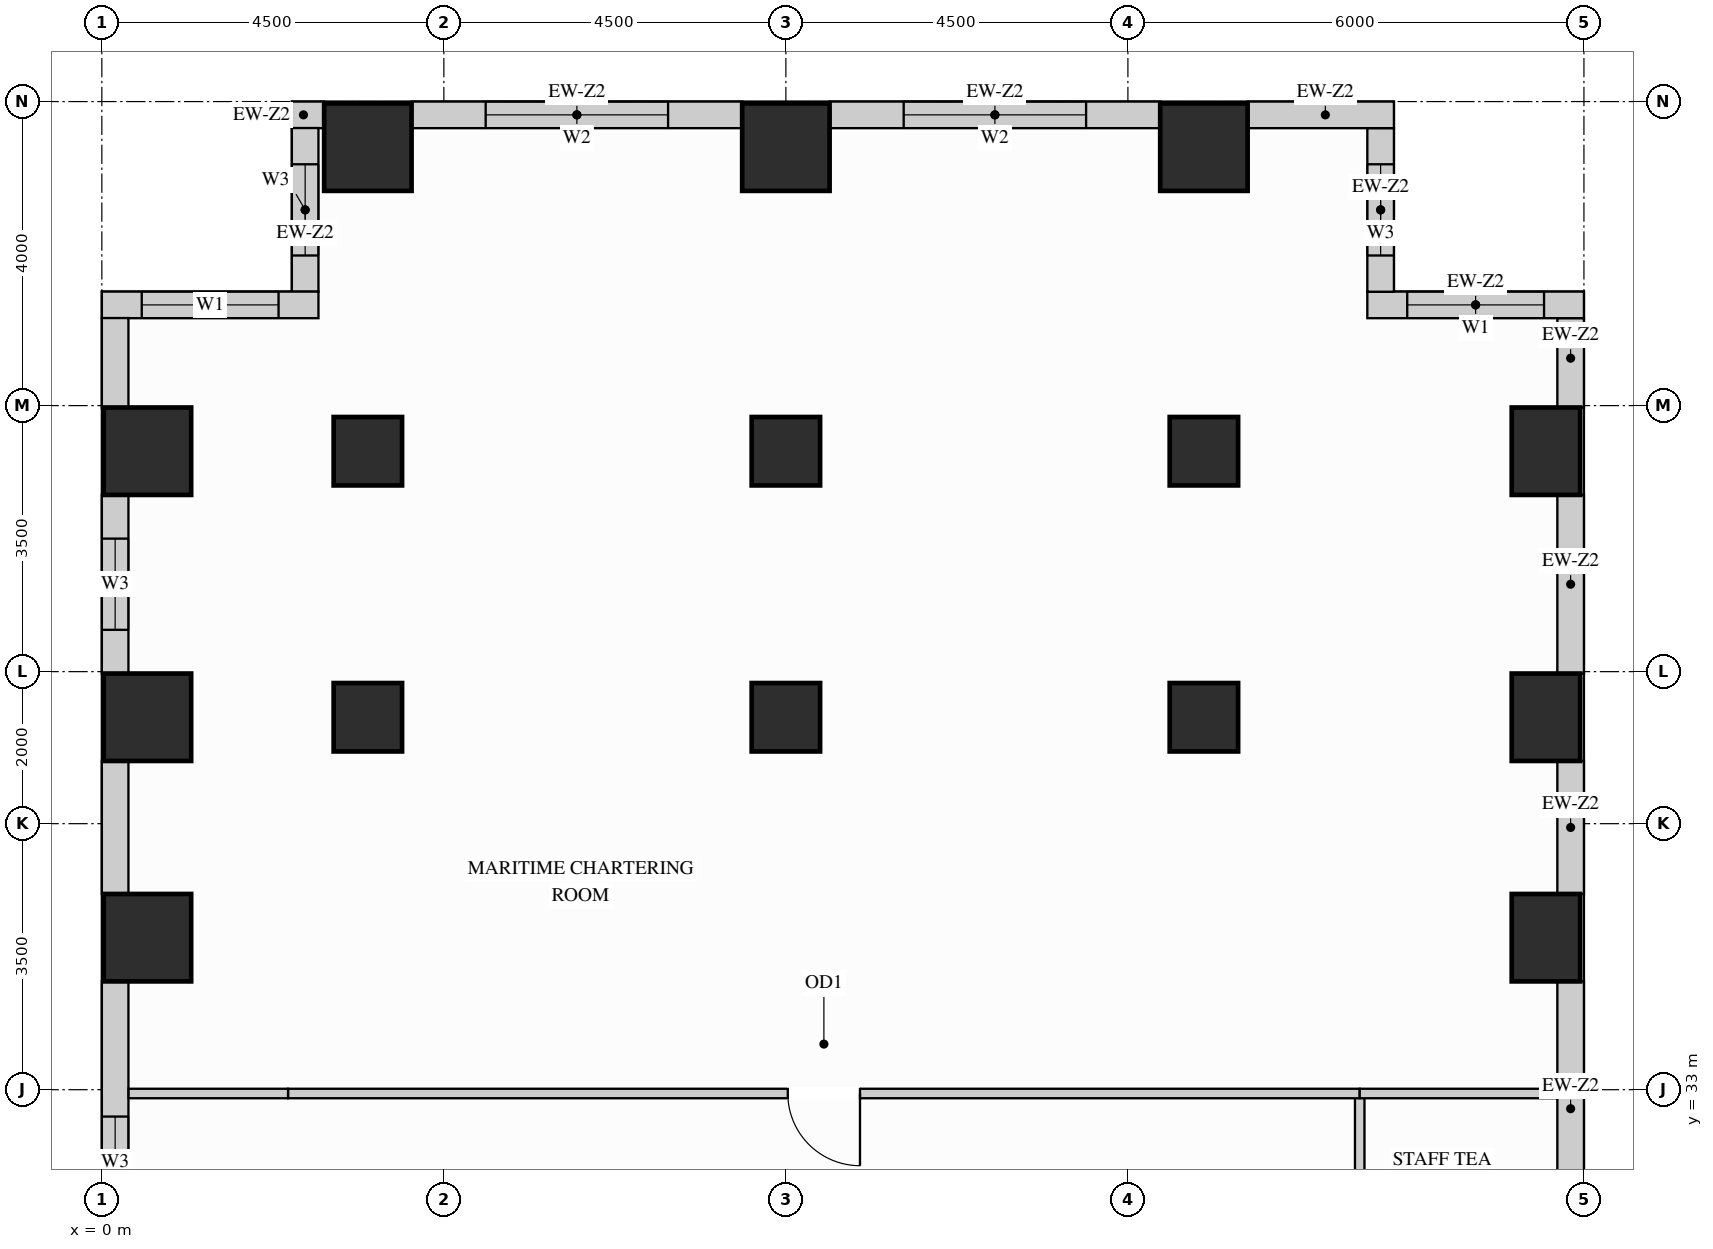
"""IFC4 building model, lengths in metres.
Left out: names, types, materials, properties, quantities, classifications, styles, units other than length and angle.
Written with IfcOpenShell. Run it as: python <this file> out.ifc"""

import sys

from ifc_helpers import new_model, si_unit, direction, frame, frame_2d, origin, origin_2d, place, context, subcontext, project, spatial, rectangle, extrude, source, transform, mapped, element, fill, save


model = new_model("IFC4")
c1 = context("Model", 3, precision=1e-05, world=origin(), true_north=direction((0.0, 1.0)))
c2 = subcontext(c1, "Body", "Model", "MODEL_VIEW")
j1 = project(units=[si_unit("LENGTHUNIT", "METRE"), si_unit("PLANEANGLEUNIT", "RADIAN")], contexts=[c1])
p1 = place(None, origin())
s1 = spatial("IfcSite", under=j1, at=p1, CompositionType="ELEMENT")
p2 = place(p1, origin())
s2 = spatial("IfcBuilding", under=s1, at=p2, CompositionType="ELEMENT")
p3 = place(p2, frame((0.0, 0.0, 124.2)))
s3 = spatial("IfcBuildingStorey", under=s2, at=p3, CompositionType="ELEMENT", Elevation=124.2)
m1 = source(origin(), c2, "Body", "SweptSolid", [
    extrude(rectangle(XDim=0.9, YDim=0.9, at=origin_2d()), origin(), (0.0, 0.0, 1.0), 3.38),
])
for number, where, z_axis, x_axis in (
    (1, (14.5, 37.9, 0.0), (0.0, 0.0, 1.0), (1.0, 0.0, 0.0)),
    (2, (14.5, 41.4, 0.0), (0.0, 0.0, 1.0), (1.0, 0.0, 0.0)),
    (3, (3.5, 37.9, 0.0), (0.0, 0.0, 1.0), (1.0, 0.0, 0.0)),
    (4, (3.5, 41.4, 0.0), (0.0, 0.0, 1.0), (1.0, 0.0, 0.0)),
    (5, (9.0, 37.9, 0.0), (0.0, 0.0, 1.0), (1.0, 0.0, 0.0)),
    (6, (9.0, 41.4, 0.0), (0.0, 0.0, 1.0), (1.0, 0.0, 0.0)),
):
    element("IfcColumn", number, at=place(p3, frame(where, z_axis=z_axis, x_axis=x_axis)), inside=s3, PredefinedType="COLUMN", context=c2, shape_type="MappedRepresentation", body=[
        mapped(m1, transform((0.0, 0.0, 0.0), x_axis=(1.0, 0.0, 0.0), y_axis=(0.0, 1.0, 0.0), z_axis=(0.0, 0.0, 1.0))),
    ])
m2 = source(origin(), c2, "Body", "SweptSolid", [
    extrude(rectangle(XDim=0.9, YDim=1.15, at=origin_2d()), origin(), (0.0, 0.0, 1.0), 3.38),
])
for number, where, z_axis, x_axis in (
    (7, (19.0, 35.0, 0.0), (0.0, 0.0, 1.0), (1.0, 0.0, 0.0)),
    (8, (19.0, 37.9, 0.0), (0.0, 0.0, 1.0), (1.0, 0.0, 0.0)),
    (9, (19.0, 41.4, 0.0), (0.0, 0.0, 1.0), (1.0, 0.0, 0.0)),
):
    element("IfcColumn", number, at=place(p3, frame(where, z_axis=z_axis, x_axis=x_axis)), inside=s3, PredefinedType="COLUMN", context=c2, shape_type="MappedRepresentation", body=[
        mapped(m2, transform((0.0, 0.0, 0.0), x_axis=(1.0, 0.0, 0.0), y_axis=(0.0, 1.0, 0.0), z_axis=(0.0, 0.0, 1.0))),
    ])
m3 = source(origin(), c2, "Body", "SweptSolid", [
    extrude(rectangle(XDim=1.15, YDim=1.15, at=origin_2d()), origin(), (0.0, 0.0, 1.0), 3.38),
])
for number, where, z_axis, x_axis in (
    (10, (14.5, 45.4, 0.0), (0.0, 0.0, 1.0), (1.0, 0.0, 0.0)),
    (11, (3.5, 45.4, 0.0), (0.0, 0.0, 1.0), (1.0, 0.0, 0.0)),
    (12, (9.0, 45.4, 0.0), (0.0, 0.0, 1.0), (1.0, 0.0, 0.0)),
    (13, (0.6, 35.0, 0.0), (0.0, 0.0, 1.0), (1.0, 0.0, 0.0)),
    (14, (0.6, 37.9, 0.0), (0.0, 0.0, 1.0), (1.0, 0.0, 0.0)),
    (15, (0.6, 41.4, 0.0), (0.0, 0.0, 1.0), (1.0, 0.0, 0.0)),
):
    element("IfcColumn", number, at=place(p3, frame(where, z_axis=z_axis, x_axis=x_axis)), inside=s3, PredefinedType="COLUMN", context=c2, shape_type="MappedRepresentation", body=[
        mapped(m3, transform((0.0, 0.0, 0.0), x_axis=(1.0, 0.0, 0.0), y_axis=(0.0, 1.0, 0.0), z_axis=(0.0, 0.0, 1.0))),
    ])
m4 = source(origin(), c2, "Body", "SweptSolid", [
    extrude(rectangle(XDim=3.354, YDim=0.35, at=frame_2d((1.677, 0.0))), origin(), (0.0, 0.0, 1.0), 2.519),
])
p4 = place(p3, frame((19.325, 31.073, 0.0), z_axis=(0.0, 0.0, 1.0), x_axis=(0.0, 1.0, 0.0)))
e16 = element("IfcWall", 16, at=p4, inside=s3, PredefinedType="SOLIDWALL", context=c2, shape_type="MappedRepresentation", body=[
    mapped(m4, transform((0.0, 0.0, 0.0), x_axis=(1.0, 0.0, 0.0), y_axis=(0.0, 1.0, 0.0), z_axis=(0.0, 0.0, 1.0))),
])
m5 = source(origin(), c2, "Body", "SweptSolid", [
    extrude(rectangle(XDim=1.754, YDim=0.35, at=frame_2d((0.877, 0.0))), origin(), (0.0, 0.0, 1.0), 2.519),
])
p5 = place(p3, frame((19.325, 35.573, 0.0), z_axis=(0.0, 0.0, 1.0), x_axis=(0.0, 1.0, 0.0)))
e17 = element("IfcWall", 17, at=p5, inside=s3, PredefinedType="SOLIDWALL", context=c2, shape_type="MappedRepresentation", body=[
    mapped(m5, transform((0.0, 0.0, 0.0), x_axis=(1.0, 0.0, 0.0), y_axis=(0.0, 1.0, 0.0), z_axis=(0.0, 0.0, 1.0))),
])
m6 = source(origin(), c2, "Body", "SweptSolid", [
    extrude(rectangle(XDim=2.354, YDim=0.35, at=frame_2d((1.177, 0.0))), origin(), (0.0, 0.0, 1.0), 2.519),
])
p6 = place(p3, frame((19.325, 38.473, 0.0), z_axis=(0.0, 0.0, 1.0), x_axis=(0.0, 1.0, 0.0)))
e18 = element("IfcWall", 18, at=p6, inside=s3, PredefinedType="SOLIDWALL", context=c2, shape_type="MappedRepresentation", body=[
    mapped(m6, transform((0.0, 0.0, 0.0), x_axis=(1.0, 0.0, 0.0), y_axis=(0.0, 1.0, 0.0), z_axis=(0.0, 0.0, 1.0))),
])
m7 = source(origin(), c2, "Body", "SweptSolid", [
    extrude(rectangle(XDim=1.179, YDim=0.35, at=frame_2d((0.59, 0.0))), origin(), (0.0, 0.0, 1.0), 3.365),
])
p7 = place(p3, frame((19.325, 41.973, 0.0), z_axis=(0.0, 0.0, 1.0), x_axis=(0.0, 1.0, 0.0)))
e19 = element("IfcWall", 19, at=p7, inside=s3, PredefinedType="SOLIDWALL", context=c2, shape_type="MappedRepresentation", body=[
    mapped(m7, transform((0.0, 0.0, 0.0), x_axis=(1.0, 0.0, 0.0), y_axis=(0.0, 1.0, 0.0), z_axis=(0.0, 0.0, 1.0))),
])
p8 = place(p3, frame((19.5, 43.325, 0.0), z_axis=(0.0, 0.0, 1.0), x_axis=(-1.0, 0.0, 0.0)))
e20 = element("IfcWall", 20, at=p8, inside=s3, PredefinedType="SOLIDWALL", context=c2, shape_type="SweptSolid", body=[
    extrude(rectangle(XDim=2.85, YDim=0.35, at=frame_2d((1.425, 0.0))), origin(), (0.0, 0.0, 1.0), 3.365),
])
p9 = place(p8, frame((0.525, 0.0, 0.78)))
e21 = element("IfcOpeningElement", 21, at=p9, cuts=e20, PredefinedType="OPENING", context=c2, shape_type="SweptSolid", body=[
    extrude(rectangle(XDim=1.8, YDim=2.1, at=frame_2d((0.9, 1.05))), frame((0.0, 0.185, 0.0), z_axis=(0.0, -1.0, 0.0), x_axis=(1.0, 0.0, 0.0)), (0.0, 0.0, 1.0), 0.37),
])
p10 = place(p3, frame((16.825, 43.498, 0.0), z_axis=(0.0, 0.0, 1.0), x_axis=(0.0, 1.0, 0.0)))
e22 = element("IfcWall", 22, at=p10, inside=s3, PredefinedType="SOLIDWALL", context=c2, shape_type="SweptSolid", body=[
    extrude(rectangle(XDim=2.154, YDim=0.35, at=frame_2d((1.077, 0.0))), origin(), (0.0, 0.0, 1.0), 3.365),
])
p11 = place(p10, frame((0.477, 0.0, 0.78)))
e23 = element("IfcOpeningElement", 23, at=p11, cuts=e22, PredefinedType="OPENING", context=c2, shape_type="SweptSolid", body=[
    extrude(rectangle(XDim=1.2, YDim=2.1, at=frame_2d((0.6, 1.05))), frame((0.0, 0.185, 0.0), z_axis=(0.0, -1.0, 0.0), x_axis=(1.0, 0.0, 0.0)), (0.0, 0.0, 1.0), 0.37),
])
m8 = source(origin(), c2, "Body", "SweptSolid", [
    extrude(rectangle(XDim=1.927, YDim=0.35, at=frame_2d((0.963, 0.0))), origin(), (0.0, 0.0, 1.0), 3.365),
])
p12 = place(p3, frame((17.0, 45.825, 0.0), z_axis=(0.0, 0.0, 1.0), x_axis=(-1.0, 0.0, 0.0)))
e24 = element("IfcWall", 24, at=p12, inside=s3, PredefinedType="SOLIDWALL", context=c2, shape_type="MappedRepresentation", body=[
    mapped(m8, transform((0.0, 0.0, 0.0), x_axis=(1.0, 0.0, 0.0), y_axis=(0.0, 1.0, 0.0), z_axis=(0.0, 0.0, 1.0))),
])
p13 = place(p3, frame((13.927, 45.825, 0.0), z_axis=(0.0, 0.0, 1.0), x_axis=(-1.0, 0.0, 0.0)))
e25 = element("IfcWall", 25, at=p13, inside=s3, PredefinedType="SOLIDWALL", context=c2, shape_type="SweptSolid", body=[
    extrude(rectangle(XDim=4.354, YDim=0.35, at=frame_2d((2.177, 0.0))), origin(), (0.0, 0.0, 1.0), 3.365),
])
p14 = place(p13, frame((0.977, 0.0, 0.78)))
e26 = element("IfcOpeningElement", 26, at=p14, cuts=e25, PredefinedType="OPENING", context=c2, shape_type="SweptSolid", body=[
    extrude(rectangle(XDim=2.4, YDim=2.1, at=frame_2d((1.2, 1.05))), frame((0.0, 0.185, 0.0), z_axis=(0.0, -1.0, 0.0), x_axis=(1.0, 0.0, 0.0)), (0.0, 0.0, 1.0), 0.37),
])
p15 = place(p3, frame((8.427, 45.825, 0.0), z_axis=(0.0, 0.0, 1.0), x_axis=(-1.0, 0.0, 0.0)))
e27 = element("IfcWall", 27, at=p15, inside=s3, PredefinedType="SOLIDWALL", context=c2, shape_type="SweptSolid", body=[
    extrude(rectangle(XDim=4.354, YDim=0.35, at=frame_2d((2.177, 0.0))), origin(), (0.0, 0.0, 1.0), 3.365),
])
p16 = place(p15, frame((0.977, 0.0, 0.78)))
e28 = element("IfcOpeningElement", 28, at=p16, cuts=e27, PredefinedType="OPENING", context=c2, shape_type="SweptSolid", body=[
    extrude(rectangle(XDim=2.4, YDim=2.1, at=frame_2d((1.2, 1.05))), frame((0.0, 0.185, 0.0), z_axis=(0.0, -1.0, 0.0), x_axis=(1.0, 0.0, 0.0)), (0.0, 0.0, 1.0), 0.37),
])
m9 = source(origin(), c2, "Body", "SweptSolid", [
    extrude(rectangle(XDim=0.427, YDim=0.35, at=frame_2d((0.213, 0.0))), origin(), (0.0, 0.0, 1.0), 3.365),
])
p17 = place(p3, frame((2.927, 45.825, 0.0), z_axis=(0.0, 0.0, 1.0), x_axis=(-1.0, 0.0, 0.0)))
e29 = element("IfcWall", 29, at=p17, inside=s3, PredefinedType="SOLIDWALL", context=c2, shape_type="MappedRepresentation", body=[
    mapped(m9, transform((0.0, 0.0, 0.0), x_axis=(1.0, 0.0, 0.0), y_axis=(0.0, 1.0, 0.0), z_axis=(0.0, 0.0, 1.0))),
])
p18 = place(p3, frame((2.675, 45.652, 0.0), z_axis=(0.0, 0.0, 1.0), x_axis=(0.0, -1.0, 0.0)))
e30 = element("IfcWall", 30, at=p18, inside=s3, PredefinedType="SOLIDWALL", context=c2, shape_type="SweptSolid", body=[
    extrude(rectangle(XDim=2.154, YDim=0.35, at=frame_2d((1.077, 0.0))), origin(), (0.0, 0.0, 1.0), 3.365),
])
p19 = place(p18, frame((0.477, 0.0, 0.78)))
e31 = element("IfcOpeningElement", 31, at=p19, cuts=e30, PredefinedType="OPENING", context=c2, shape_type="SweptSolid", body=[
    extrude(rectangle(XDim=1.2, YDim=2.1, at=frame_2d((0.6, 1.05))), frame((0.0, 0.185, 0.0), z_axis=(0.0, -1.0, 0.0), x_axis=(1.0, 0.0, 0.0)), (0.0, 0.0, 1.0), 0.37),
])
p20 = place(p3, frame((2.85, 43.325, 0.0), z_axis=(0.0, 0.0, 1.0), x_axis=(-1.0, 0.0, 0.0)))
e32 = element("IfcWall", 32, at=p20, inside=s3, PredefinedType="SOLIDWALL", context=c2, shape_type="SweptSolid", body=[
    extrude(rectangle(XDim=2.85, YDim=0.35, at=frame_2d((1.425, 0.0))), origin(), (0.0, 0.0, 1.0), 3.365),
])
p21 = place(p20, frame((0.525, 0.0, 0.78)))
e33 = element("IfcOpeningElement", 33, at=p21, cuts=e32, PredefinedType="OPENING", context=c2, shape_type="SweptSolid", body=[
    extrude(rectangle(XDim=1.8, YDim=2.1, at=frame_2d((0.9, 1.05))), frame((0.0, 0.185, 0.0), z_axis=(0.0, -1.0, 0.0), x_axis=(1.0, 0.0, 0.0)), (0.0, 0.0, 1.0), 0.37),
])
p22 = place(p3, frame((0.175, 43.152, 0.0), z_axis=(0.0, 0.0, 1.0), x_axis=(0.0, -1.0, 0.0)))
e34 = element("IfcWall", 34, at=p22, inside=s3, PredefinedType="SOLIDWALL", context=c2, shape_type="MappedRepresentation", body=[
    mapped(m7, transform((0.0, 0.0, 0.0), x_axis=(1.0, 0.0, 0.0), y_axis=(0.0, 1.0, 0.0), z_axis=(0.0, 0.0, 1.0))),
])
p23 = place(p3, frame((0.175, 40.827, 0.0), z_axis=(0.0, 0.0, 1.0), x_axis=(0.0, -1.0, 0.0)))
e35 = element("IfcWall", 35, at=p23, inside=s3, PredefinedType="SOLIDWALL", context=c2, shape_type="SweptSolid", body=[
    extrude(rectangle(XDim=2.354, YDim=0.35, at=frame_2d((1.177, 0.0))), origin(), (0.0, 0.0, 1.0), 3.365),
])
p24 = place(p23, frame((0.577, 0.0, 0.78)))
e36 = element("IfcOpeningElement", 36, at=p24, cuts=e35, PredefinedType="OPENING", context=c2, shape_type="SweptSolid", body=[
    extrude(rectangle(XDim=1.2, YDim=2.1, at=frame_2d((0.6, 1.05))), frame((0.0, 0.185, 0.0), z_axis=(0.0, -1.0, 0.0), x_axis=(1.0, 0.0, 0.0)), (0.0, 0.0, 1.0), 0.37),
])
m10 = source(origin(), c2, "Body", "SweptSolid", [
    extrude(rectangle(XDim=1.754, YDim=0.35, at=frame_2d((0.877, 0.0))), origin(), (0.0, 0.0, 1.0), 3.365),
])
p25 = place(p3, frame((0.175, 37.327, 0.0), z_axis=(0.0, 0.0, 1.0), x_axis=(0.0, -1.0, 0.0)))
e37 = element("IfcWall", 37, at=p25, inside=s3, PredefinedType="SOLIDWALL", context=c2, shape_type="MappedRepresentation", body=[
    mapped(m10, transform((0.0, 0.0, 0.0), x_axis=(1.0, 0.0, 0.0), y_axis=(0.0, 1.0, 0.0), z_axis=(0.0, 0.0, 1.0))),
])
p26 = place(p3, frame((0.175, 34.427, 0.0), z_axis=(0.0, 0.0, 1.0), x_axis=(0.0, -1.0, 0.0)))
e38 = element("IfcWall", 38, at=p26, inside=s3, PredefinedType="SOLIDWALL", context=c2, shape_type="SweptSolid", body=[
    extrude(rectangle(XDim=3.354, YDim=0.35, at=frame_2d((1.677, 0.0))), origin(), (0.0, 0.0, 1.0), 3.365),
])
p27 = place(p26, frame((1.781, 0.0, 0.78)))
e39 = element("IfcOpeningElement", 39, at=p27, cuts=e38, PredefinedType="OPENING", context=c2, shape_type="SweptSolid", body=[
    extrude(rectangle(XDim=1.2, YDim=2.1, at=frame_2d((0.6, 1.05))), frame((0.0, 0.185, 0.0), z_axis=(0.0, -1.0, 0.0), x_axis=(1.0, 0.0, 0.0)), (0.0, 0.0, 1.0), 0.37),
])
p28 = place(p3, frame((16.55, 26.05, 0.0), z_axis=(0.0, 0.0, 1.0), x_axis=(0.0, 1.0, 0.0)))
e40 = element("IfcWall", 40, at=p28, inside=s3, PredefinedType="PARTITIONING", context=c2, shape_type="SweptSolid", body=[
    extrude(rectangle(XDim=6.9, YDim=0.125, at=frame_2d((3.45, 0.0))), origin(), (0.0, 0.0, 1.0), 3.365),
])
p29 = place(p28, frame((2.975, 0.0, 0.0)))
e41 = element("IfcOpeningElement", 41, at=p29, cuts=e40, PredefinedType="OPENING", context=c2, shape_type="SweptSolid", body=[
    extrude(rectangle(XDim=0.95, YDim=2.15, at=frame_2d((0.475, 1.075))), frame((0.0, 0.073, 0.0), z_axis=(0.0, -1.0, 0.0), x_axis=(1.0, 0.0, 0.0)), (0.0, 0.0, 1.0), 0.145),
])
p30 = place(p3, frame((2.45, 32.95, 0.0), z_axis=(0.0, 0.0, 1.0), x_axis=(1.0, 0.0, 0.0)))
e42 = element("IfcWall", 42, at=p30, inside=s3, PredefinedType="PARTITIONING", context=c2, shape_type="SweptSolid", body=[
    extrude(rectangle(XDim=14.1, YDim=0.125, at=frame_2d((7.05, 0.0))), origin(), (0.0, 0.0, 1.0), 3.365),
])
p31 = place(p30, frame((6.575, 0.0, 0.0)))
e43 = element("IfcOpeningElement", 43, at=p31, cuts=e42, PredefinedType="OPENING", context=c2, shape_type="SweptSolid", body=[
    extrude(rectangle(XDim=0.95, YDim=2.15, at=frame_2d((0.475, 1.075))), frame((0.0, 0.073, 0.0), z_axis=(0.0, -1.0, 0.0), x_axis=(1.0, 0.0, 0.0)), (0.0, 0.0, 1.0), 0.145),
])
m11 = source(origin(), c2, "Body", "SweptSolid", [
    extrude(rectangle(XDim=2.598, YDim=0.125, at=frame_2d((1.299, 0.0))), origin(), (0.0, 0.0, 1.0), 3.365),
])
p32 = place(p3, frame((16.55, 32.95, 0.0), z_axis=(0.0, 0.0, 1.0), x_axis=(1.0, 0.0, 0.0)))
e44 = element("IfcWall", 44, at=p32, inside=s3, PredefinedType="PARTITIONING", context=c2, shape_type="MappedRepresentation", body=[
    mapped(m11, transform((0.0, 0.0, 0.0), x_axis=(1.0, 0.0, 0.0), y_axis=(0.0, 1.0, 0.0), z_axis=(0.0, 0.0, 1.0))),
])
m12 = source(origin(), c2, "Body", "SweptSolid", [
    extrude(rectangle(XDim=2.098, YDim=0.125, at=frame_2d((1.049, 0.0))), origin(), (0.0, 0.0, 1.0), 3.365),
])
p33 = place(p3, frame((0.352, 32.95, 0.0), z_axis=(0.0, 0.0, 1.0), x_axis=(1.0, 0.0, 0.0)))
e45 = element("IfcWall", 45, at=p33, inside=s3, PredefinedType="PARTITIONING", context=c2, shape_type="MappedRepresentation", body=[
    mapped(m12, transform((0.0, 0.0, 0.0), x_axis=(1.0, 0.0, 0.0), y_axis=(0.0, 1.0, 0.0), z_axis=(0.0, 0.0, 1.0))),
])
m13 = source(origin(), c2, "Body", "SweptSolid", [
    extrude(rectangle(XDim=0.95, YDim=2.15, at=frame_2d((0.475, 1.075))), frame((0.0, 0.025, 0.0), z_axis=(0.0, -1.0, 0.0), x_axis=(1.0, 0.0, 0.0)), (0.0, 0.0, 1.0), 0.05),
])
p34 = place(p31, origin())
e46 = element("IfcDoor", 46, at=p34, inside=s3, OperationType="SINGLE_SWING_RIGHT", PredefinedType="DOOR", context=c2, shape_type="MappedRepresentation", body=[
    mapped(m13, transform((0.0, 0.0, 0.0), x_axis=(1.0, 0.0, 0.0), y_axis=(0.0, 1.0, 0.0), z_axis=(0.0, 0.0, 1.0))),
])
fill(e43, e46)
m14 = source(origin(), c2, "Body", "SweptSolid", [
    extrude(rectangle(XDim=1.8, YDim=2.1, at=frame_2d((0.9, 1.05))), frame((0.0, 0.03, 0.0), z_axis=(0.0, -1.0, 0.0), x_axis=(1.0, 0.0, 0.0)), (0.0, 0.0, 1.0), 0.06),
])
p35 = place(p9, origin())
e47 = element("IfcWindow", 47, at=p35, inside=s3, PartitioningType="SINGLE_PANEL", PredefinedType="WINDOW", context=c2, shape_type="MappedRepresentation", body=[
    mapped(m14, transform((0.0, 0.0, 0.0), x_axis=(1.0, 0.0, 0.0), y_axis=(0.0, 1.0, 0.0), z_axis=(0.0, 0.0, 1.0))),
])
fill(e21, e47)
p36 = place(p21, origin())
e48 = element("IfcWindow", 48, at=p36, inside=s3, PartitioningType="SINGLE_PANEL", PredefinedType="WINDOW", context=c2, shape_type="MappedRepresentation", body=[
    mapped(m14, transform((0.0, 0.0, 0.0), x_axis=(1.0, 0.0, 0.0), y_axis=(0.0, 1.0, 0.0), z_axis=(0.0, 0.0, 1.0))),
])
fill(e33, e48)
m15 = source(origin(), c2, "Body", "SweptSolid", [
    extrude(rectangle(XDim=2.4, YDim=2.1, at=frame_2d((1.2, 1.05))), frame((0.0, 0.03, 0.0), z_axis=(0.0, -1.0, 0.0), x_axis=(1.0, 0.0, 0.0)), (0.0, 0.0, 1.0), 0.06),
])
p37 = place(p14, origin())
e49 = element("IfcWindow", 49, at=p37, inside=s3, PartitioningType="SINGLE_PANEL", PredefinedType="WINDOW", context=c2, shape_type="MappedRepresentation", body=[
    mapped(m15, transform((0.0, 0.0, 0.0), x_axis=(1.0, 0.0, 0.0), y_axis=(0.0, 1.0, 0.0), z_axis=(0.0, 0.0, 1.0))),
])
fill(e26, e49)
p38 = place(p16, origin())
e50 = element("IfcWindow", 50, at=p38, inside=s3, PartitioningType="SINGLE_PANEL", PredefinedType="WINDOW", context=c2, shape_type="MappedRepresentation", body=[
    mapped(m15, transform((0.0, 0.0, 0.0), x_axis=(1.0, 0.0, 0.0), y_axis=(0.0, 1.0, 0.0), z_axis=(0.0, 0.0, 1.0))),
])
fill(e28, e50)
m16 = source(origin(), c2, "Body", "SweptSolid", [
    extrude(rectangle(XDim=1.2, YDim=2.1, at=frame_2d((0.6, 1.05))), frame((0.0, 0.03, 0.0), z_axis=(0.0, -1.0, 0.0), x_axis=(1.0, 0.0, 0.0)), (0.0, 0.0, 1.0), 0.06),
])
p39 = place(p11, origin())
e51 = element("IfcWindow", 51, at=p39, inside=s3, PartitioningType="SINGLE_PANEL", PredefinedType="WINDOW", context=c2, shape_type="MappedRepresentation", body=[
    mapped(m16, transform((0.0, 0.0, 0.0), x_axis=(1.0, 0.0, 0.0), y_axis=(0.0, 1.0, 0.0), z_axis=(0.0, 0.0, 1.0))),
])
fill(e23, e51)
p40 = place(p19, origin())
e52 = element("IfcWindow", 52, at=p40, inside=s3, PartitioningType="SINGLE_PANEL", PredefinedType="WINDOW", context=c2, shape_type="MappedRepresentation", body=[
    mapped(m16, transform((0.0, 0.0, 0.0), x_axis=(1.0, 0.0, 0.0), y_axis=(0.0, 1.0, 0.0), z_axis=(0.0, 0.0, 1.0))),
])
fill(e31, e52)
p41 = place(p24, origin())
e53 = element("IfcWindow", 53, at=p41, inside=s3, PartitioningType="SINGLE_PANEL", PredefinedType="WINDOW", context=c2, shape_type="MappedRepresentation", body=[
    mapped(m16, transform((0.0, 0.0, 0.0), x_axis=(1.0, 0.0, 0.0), y_axis=(0.0, 1.0, 0.0), z_axis=(0.0, 0.0, 1.0))),
])
fill(e36, e53)
p42 = place(p27, origin())
e54 = element("IfcWindow", 54, at=p42, inside=s3, PartitioningType="SINGLE_PANEL", PredefinedType="WINDOW", context=c2, shape_type="MappedRepresentation", body=[
    mapped(m16, transform((0.0, 0.0, 0.0), x_axis=(1.0, 0.0, 0.0), y_axis=(0.0, 1.0, 0.0), z_axis=(0.0, 0.0, 1.0))),
])
fill(e39, e54)
save(model, sys.argv[1])
